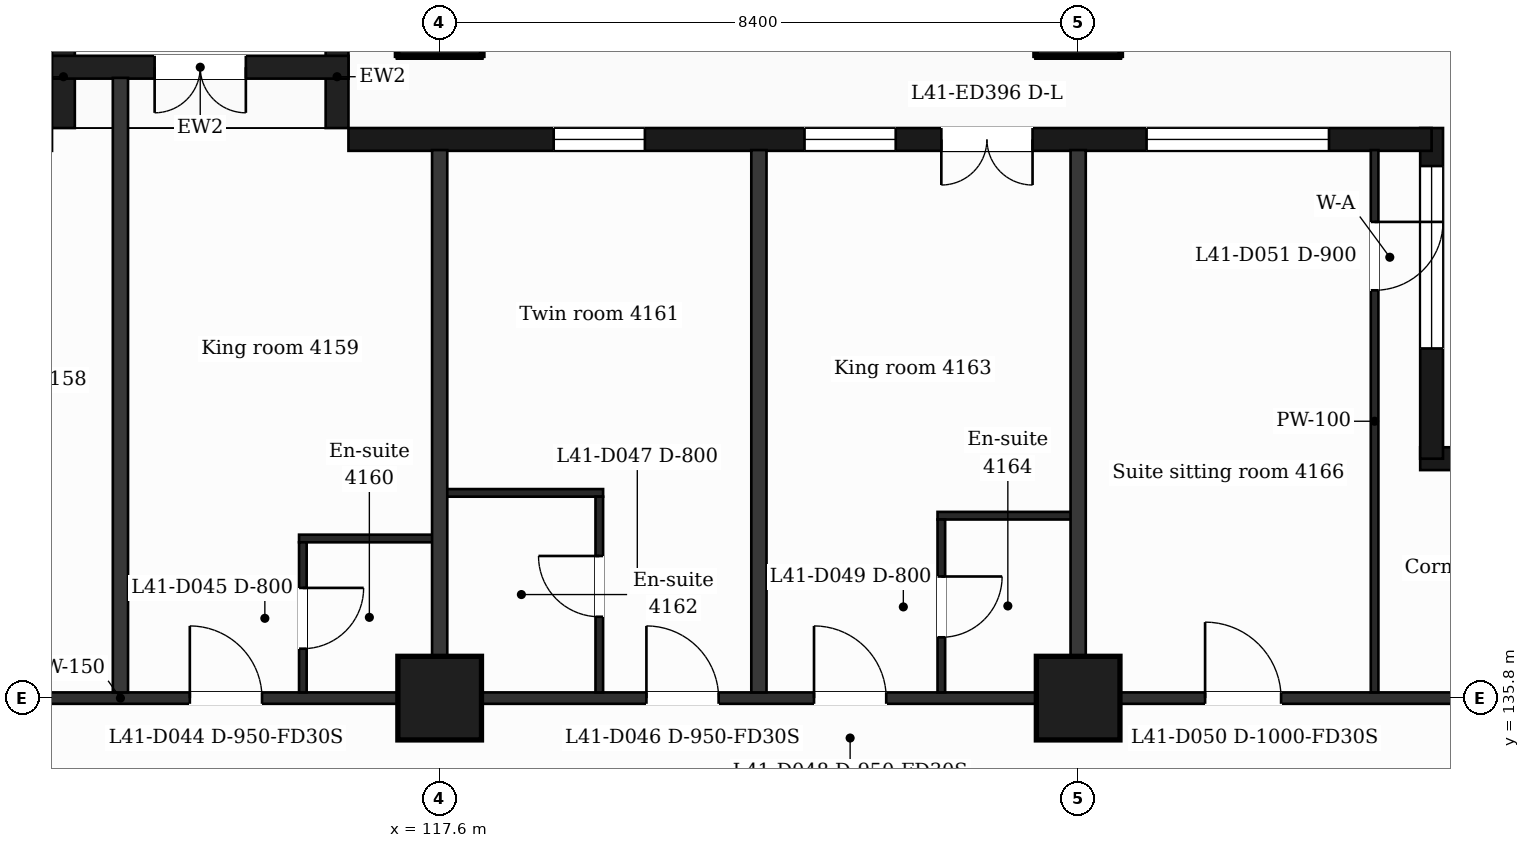
"""IFC4 building model, lengths in metres.
Left out: names, types, materials, properties, quantities, classifications, styles, units other than length and angle.
Written with IfcOpenShell. Run it as: python <this file> out.ifc"""

import sys

from ifc_helpers import new_model, si_unit, direction, frame, frame_2d, origin, origin_2d, place, context, subcontext, project, spatial, rectangle, extrude, element, fill, save


model = new_model("IFC4")
c1 = context("Model", 3, precision=1e-05, world=origin(), true_north=direction((0.0, 1.0)))
c2 = subcontext(c1, "Body", "Model", "MODEL_VIEW")
j1 = project(units=[si_unit("LENGTHUNIT", "METRE"), si_unit("PLANEANGLEUNIT", "RADIAN")], contexts=[c1])
p1 = place(None, origin())
s1 = spatial("IfcSite", under=j1, at=p1, CompositionType="ELEMENT")
p2 = place(p1, origin())
s2 = spatial("IfcBuilding", under=s1, at=p2, CompositionType="ELEMENT")
p3 = place(p2, frame((0.0, 0.0, 173.7)))
s3 = spatial("IfcBuildingStorey", under=s2, at=p3, CompositionType="ELEMENT", Elevation=173.7)
for number, where, z_axis, x_axis in (
    (1, (117.6, 135.8, 0.0), (0.0, 0.0, 1.0), (1.0, 0.0, 0.0)),
    (2, (126.0, 135.8, 0.0), (0.0, 0.0, 1.0), (1.0, 0.0, 0.0)),
    (3, (117.6, 144.8, 0.0), (0.0, 0.0, 1.0), (1.0, 0.0, 0.0)),
    (4, (126.0, 144.8, 0.0), (0.0, 0.0, 1.0), (1.0, 0.0, 0.0)),
):
    element("IfcColumn", number, at=place(p3, frame(where, z_axis=z_axis, x_axis=x_axis)), inside=s3, PredefinedType="COLUMN", context=c2, shape_type="SweptSolid", body=[
        extrude(rectangle(XDim=1.1, YDim=1.1, at=origin_2d()), origin(), (0.0, 0.0, 1.0), 3.7),
    ])
p4 = place(p3, frame((135.623, 138.95, 0.0), z_axis=(0.0, 0.0, 1.0), x_axis=(-1.0, 0.0, 0.0)))
e5 = element("IfcWall", 5, at=p4, inside=s3, PredefinedType="SOLIDWALL", context=c2, shape_type="SweptSolid", body=[
    extrude(rectangle(XDim=5.123, YDim=0.3, at=frame_2d((2.561, 0.0))), origin(), (0.0, 0.0, 1.0), 3.38),
])
p5 = place(p4, frame((1.673, 0.0, 0.9)))
e6 = element("IfcOpeningElement", 6, at=p5, cuts=e5, PredefinedType="OPENING", context=c2, shape_type="SweptSolid", body=[
    extrude(rectangle(XDim=1.2, YDim=2.1, at=frame_2d((0.6, 1.05))), frame((0.0, 0.16, 0.0), z_axis=(0.0, -1.0, 0.0), x_axis=(1.0, 0.0, 0.0)), (0.0, 0.0, 1.0), 0.32),
])
p6 = place(p4, frame((3.473, 0.0, 0.9)))
e7 = element("IfcOpeningElement", 7, at=p6, cuts=e5, PredefinedType="OPENING", context=c2, shape_type="SweptSolid", body=[
    extrude(rectangle(XDim=1.2, YDim=2.1, at=frame_2d((0.6, 1.05))), frame((0.0, 0.16, 0.0), z_axis=(0.0, -1.0, 0.0), x_axis=(1.0, 0.0, 0.0)), (0.0, 0.0, 1.0), 0.32),
])
p7 = place(p3, frame((130.65, 138.95, 0.0), z_axis=(0.0, 0.0, 1.0), x_axis=(0.0, 1.0, 0.0)))
e8 = element("IfcWall", 8, at=p7, inside=s3, PredefinedType="SOLIDWALL", context=c2, shape_type="SweptSolid", body=[
    extrude(rectangle(XDim=4.35, YDim=0.3, at=frame_2d((2.175, 0.0))), origin(), (0.0, 0.0, 1.0), 3.38),
])
p8 = place(p7, frame((1.45, 0.0, 0.9)))
e9 = element("IfcOpeningElement", 9, at=p8, cuts=e8, PredefinedType="OPENING", context=c2, shape_type="SweptSolid", body=[
    extrude(rectangle(XDim=2.4, YDim=2.1, at=frame_2d((1.2, 1.05))), frame((0.0, 0.16, 0.0), z_axis=(0.0, -1.0, 0.0), x_axis=(1.0, 0.0, 0.0)), (0.0, 0.0, 1.0), 0.32),
])
p9 = place(p3, frame((130.65, 143.15, 0.0), z_axis=(0.0, 0.0, 1.0), x_axis=(-1.0, 0.0, 0.0)))
e10 = element("IfcWall", 10, at=p9, inside=s3, PredefinedType="SOLIDWALL", context=c2, shape_type="SweptSolid", body=[
    extrude(rectangle(XDim=14.25, YDim=0.3, at=frame_2d((7.125, 0.0))), origin(), (0.0, 0.0, 1.0), 3.38),
])
p10 = place(p9, frame((1.35, 0.0, 0.9)))
e11 = element("IfcOpeningElement", 11, at=p10, cuts=e10, PredefinedType="OPENING", context=c2, shape_type="SweptSolid", body=[
    extrude(rectangle(XDim=2.4, YDim=2.1, at=frame_2d((1.2, 1.05))), frame((0.0, 0.16, 0.0), z_axis=(0.0, -1.0, 0.0), x_axis=(1.0, 0.0, 0.0)), (0.0, 0.0, 1.0), 0.32),
])
p11 = place(p9, frame((5.25, 0.0, 0.0)))
e12 = element("IfcOpeningElement", 12, at=p11, cuts=e10, PredefinedType="OPENING", context=c2, shape_type="SweptSolid", body=[
    extrude(rectangle(XDim=1.2, YDim=2.4, at=frame_2d((0.6, 1.2))), frame((0.0, 0.16, 0.0), z_axis=(0.0, -1.0, 0.0), x_axis=(1.0, 0.0, 0.0)), (0.0, 0.0, 1.0), 0.32),
])
p12 = place(p9, frame((7.05, 0.0, 0.9)))
e13 = element("IfcOpeningElement", 13, at=p12, cuts=e10, PredefinedType="OPENING", context=c2, shape_type="SweptSolid", body=[
    extrude(rectangle(XDim=1.2, YDim=2.1, at=frame_2d((0.6, 1.05))), frame((0.0, 0.16, 0.0), z_axis=(0.0, -1.0, 0.0), x_axis=(1.0, 0.0, 0.0)), (0.0, 0.0, 1.0), 0.32),
])
p13 = place(p9, frame((10.35, 0.0, 0.9)))
e14 = element("IfcOpeningElement", 14, at=p13, cuts=e10, PredefinedType="OPENING", context=c2, shape_type="SweptSolid", body=[
    extrude(rectangle(XDim=1.2, YDim=2.1, at=frame_2d((0.6, 1.05))), frame((0.0, 0.16, 0.0), z_axis=(0.0, -1.0, 0.0), x_axis=(1.0, 0.0, 0.0)), (0.0, 0.0, 1.0), 0.32),
])
for number, where, z_axis, x_axis in (
    (15, (116.25, 143.3, 0.0), (0.0, 0.0, 1.0), (0.0, 1.0, 0.0)),
    (16, (112.65, 143.3, 0.0), (0.0, 0.0, 1.0), (0.0, 1.0, 0.0)),
):
    element("IfcWall", number, at=place(p3, frame(where, z_axis=z_axis, x_axis=x_axis)), inside=s3, PredefinedType="SOLIDWALL", context=c2, shape_type="SweptSolid", body=[
        extrude(rectangle(XDim=1.35, YDim=0.3, at=frame_2d((0.675, 0.0))), origin(), (0.0, 0.0, 1.0), 3.38),
    ])
p14 = place(p3, frame((116.4, 144.1, 0.0), z_axis=(0.0, 0.0, 1.0), x_axis=(-1.0, 0.0, 0.0)))
e17 = element("IfcWall", 17, at=p14, inside=s3, PredefinedType="SOLIDWALL", context=c2, shape_type="SweptSolid", body=[
    extrude(rectangle(XDim=3.9, YDim=0.3, at=frame_2d((1.95, 0.0))), origin(), (0.0, 0.0, 1.0), 3.38),
])
p15 = place(p14, frame((1.35, 0.0, 0.0)))
e18 = element("IfcOpeningElement", 18, at=p15, cuts=e17, PredefinedType="OPENING", context=c2, shape_type="SweptSolid", body=[
    extrude(rectangle(XDim=1.2, YDim=2.4, at=frame_2d((0.6, 1.2))), frame((0.0, 0.16, 0.0), z_axis=(0.0, -1.0, 0.0), x_axis=(1.0, 0.0, 0.0)), (0.0, 0.0, 1.0), 0.32),
])
p16 = place(p3, frame((90.895, 135.8, 0.0), z_axis=(0.0, 0.0, 1.0), x_axis=(1.0, 0.0, 0.0)))
e19 = element("IfcWall", 19, at=p16, inside=s3, PredefinedType="PARTITIONING", context=c2, shape_type="SweptSolid", body=[
    extrude(rectangle(XDim=45.011, YDim=0.15, at=frame_2d((22.505, 0.0))), origin(), (0.0, 0.0, 1.0), 3.38),
])
p17 = place(p16, frame((6.906, 0.0, 0.0)))
e20 = element("IfcOpeningElement", 20, at=p17, cuts=e19, PredefinedType="OPENING", context=c2, shape_type="SweptSolid", body=[
    extrude(rectangle(XDim=1.0, YDim=2.1, at=frame_2d((0.5, 1.05))), frame((0.0, 0.085, 0.0), z_axis=(0.0, -1.0, 0.0), x_axis=(1.0, 0.0, 0.0)), (0.0, 0.0, 1.0), 0.17),
])
p18 = place(p16, frame((11.875, 0.0, 0.0)))
e21 = element("IfcOpeningElement", 21, at=p18, cuts=e19, PredefinedType="OPENING", context=c2, shape_type="SweptSolid", body=[
    extrude(rectangle(XDim=0.95, YDim=2.1, at=frame_2d((0.475, 1.05))), frame((0.0, 0.085, 0.0), z_axis=(0.0, -1.0, 0.0), x_axis=(1.0, 0.0, 0.0)), (0.0, 0.0, 1.0), 0.17),
])
p19 = place(p16, frame((19.292, 0.0, 0.0)))
e22 = element("IfcOpeningElement", 22, at=p19, cuts=e19, PredefinedType="OPENING", context=c2, shape_type="SweptSolid", body=[
    extrude(rectangle(XDim=0.95, YDim=2.1, at=frame_2d((0.475, 1.05))), frame((0.0, 0.085, 0.0), z_axis=(0.0, -1.0, 0.0), x_axis=(1.0, 0.0, 0.0)), (0.0, 0.0, 1.0), 0.17),
])
p20 = place(p16, frame((23.418, 0.0, 0.0)))
e23 = element("IfcOpeningElement", 23, at=p20, cuts=e19, PredefinedType="OPENING", context=c2, shape_type="SweptSolid", body=[
    extrude(rectangle(XDim=0.95, YDim=2.1, at=frame_2d((0.475, 1.05))), frame((0.0, 0.085, 0.0), z_axis=(0.0, -1.0, 0.0), x_axis=(1.0, 0.0, 0.0)), (0.0, 0.0, 1.0), 0.17),
])
p21 = place(p16, frame((29.425, 0.0, 0.0)))
e24 = element("IfcOpeningElement", 24, at=p21, cuts=e19, PredefinedType="OPENING", context=c2, shape_type="SweptSolid", body=[
    extrude(rectangle(XDim=0.95, YDim=2.1, at=frame_2d((0.475, 1.05))), frame((0.0, 0.085, 0.0), z_axis=(0.0, -1.0, 0.0), x_axis=(1.0, 0.0, 0.0)), (0.0, 0.0, 1.0), 0.17),
])
p22 = place(p16, frame((31.63, 0.0, 0.0)))
e25 = element("IfcOpeningElement", 25, at=p22, cuts=e19, PredefinedType="OPENING", context=c2, shape_type="SweptSolid", body=[
    extrude(rectangle(XDim=0.95, YDim=2.1, at=frame_2d((0.475, 1.05))), frame((0.0, 0.085, 0.0), z_axis=(0.0, -1.0, 0.0), x_axis=(1.0, 0.0, 0.0)), (0.0, 0.0, 1.0), 0.17),
])
p23 = place(p16, frame((36.775, 0.0, 0.0)))
e26 = element("IfcOpeningElement", 26, at=p23, cuts=e19, PredefinedType="OPENING", context=c2, shape_type="SweptSolid", body=[
    extrude(rectangle(XDim=1.0, YDim=2.1, at=frame_2d((0.5, 1.05))), frame((0.0, 0.085, 0.0), z_axis=(0.0, -1.0, 0.0), x_axis=(1.0, 0.0, 0.0)), (0.0, 0.0, 1.0), 0.17),
])
for number, where, z_axis, x_axis in (
    (27, (115.75, 137.9, 0.0), (0.0, 0.0, 1.0), (1.0, 0.0, 0.0)),
    (28, (124.15, 138.2, 0.0), (0.0, 0.0, 1.0), (1.0, 0.0, 0.0)),
):
    element("IfcWall", number, at=place(p3, frame(where, z_axis=z_axis, x_axis=x_axis)), inside=s3, PredefinedType="PARTITIONING", context=c2, shape_type="SweptSolid", body=[
        extrude(rectangle(XDim=1.85, YDim=0.1, at=frame_2d((0.925, 0.0))), origin(), (0.0, 0.0, 1.0), 3.38),
    ])
p24 = place(p3, frame((117.6, 138.5, 0.0), z_axis=(0.0, 0.0, 1.0), x_axis=(1.0, 0.0, 0.0)))
e29 = element("IfcWall", 29, at=p24, inside=s3, PredefinedType="PARTITIONING", context=c2, shape_type="SweptSolid", body=[
    extrude(rectangle(XDim=2.15, YDim=0.1, at=frame_2d((1.075, 0.0))), origin(), (0.0, 0.0, 1.0), 3.38),
])
p25 = place(p3, frame((113.4, 135.875, 0.0), z_axis=(0.0, 0.0, 1.0), x_axis=(0.0, 1.0, 0.0)))
e30 = element("IfcWall", 30, at=p25, inside=s3, PredefinedType="PARTITIONING", context=c2, shape_type="SweptSolid", body=[
    extrude(rectangle(XDim=8.085, YDim=0.2, at=frame_2d((4.042, 0.0))), origin(), (0.0, 0.0, 1.0), 3.38),
])
p26 = place(p3, frame((115.8, 135.875, 0.0), z_axis=(0.0, 0.0, 1.0), x_axis=(0.0, 1.0, 0.0)))
e31 = element("IfcWall", 31, at=p26, inside=s3, PredefinedType="PARTITIONING", context=c2, shape_type="SweptSolid", body=[
    extrude(rectangle(XDim=1.975, YDim=0.1, at=frame_2d((0.988, 0.0))), origin(), (0.0, 0.0, 1.0), 3.38),
])
p27 = place(p26, frame((0.575, 0.0, 0.0)))
e32 = element("IfcOpeningElement", 32, at=p27, cuts=e31, PredefinedType="OPENING", context=c2, shape_type="SweptSolid", body=[
    extrude(rectangle(XDim=0.8, YDim=2.1, at=frame_2d((0.4, 1.05))), frame((0.0, 0.06, 0.0), z_axis=(0.0, -1.0, 0.0), x_axis=(1.0, 0.0, 0.0)), (0.0, 0.0, 1.0), 0.12),
])
p28 = place(p3, frame((117.6, 135.875, 0.0), z_axis=(0.0, 0.0, 1.0), x_axis=(0.0, 1.0, 0.0)))
e33 = element("IfcWall", 33, at=p28, inside=s3, PredefinedType="PARTITIONING", context=c2, shape_type="SweptSolid", body=[
    extrude(rectangle(XDim=7.135, YDim=0.2, at=frame_2d((3.567, 0.0))), origin(), (0.0, 0.0, 1.0), 3.38),
])
p29 = place(p3, frame((119.7, 135.875, 0.0), z_axis=(0.0, 0.0, 1.0), x_axis=(0.0, 1.0, 0.0)))
e34 = element("IfcWall", 34, at=p29, inside=s3, PredefinedType="PARTITIONING", context=c2, shape_type="SweptSolid", body=[
    extrude(rectangle(XDim=2.575, YDim=0.1, at=frame_2d((1.288, 0.0))), origin(), (0.0, 0.0, 1.0), 3.38),
])
p30 = place(p29, frame((0.995, 0.0, 0.0)))
e35 = element("IfcOpeningElement", 35, at=p30, cuts=e34, PredefinedType="OPENING", context=c2, shape_type="SweptSolid", body=[
    extrude(rectangle(XDim=0.8, YDim=2.1, at=frame_2d((0.4, 1.05))), frame((0.0, 0.06, 0.0), z_axis=(0.0, -1.0, 0.0), x_axis=(1.0, 0.0, 0.0)), (0.0, 0.0, 1.0), 0.12),
])
p31 = place(p3, frame((121.8, 135.875, 0.0), z_axis=(0.0, 0.0, 1.0), x_axis=(0.0, 1.0, 0.0)))
e36 = element("IfcWall", 36, at=p31, inside=s3, PredefinedType="PARTITIONING", context=c2, shape_type="SweptSolid", body=[
    extrude(rectangle(XDim=7.135, YDim=0.2, at=frame_2d((3.567, 0.0))), origin(), (0.0, 0.0, 1.0), 3.38),
])
p32 = place(p3, frame((124.2, 135.875, 0.0), z_axis=(0.0, 0.0, 1.0), x_axis=(0.0, 1.0, 0.0)))
e37 = element("IfcWall", 37, at=p32, inside=s3, PredefinedType="PARTITIONING", context=c2, shape_type="SweptSolid", body=[
    extrude(rectangle(XDim=2.275, YDim=0.1, at=frame_2d((1.137, 0.0))), origin(), (0.0, 0.0, 1.0), 3.38),
])
p33 = place(p32, frame((0.725, 0.0, 0.0)))
e38 = element("IfcOpeningElement", 38, at=p33, cuts=e37, PredefinedType="OPENING", context=c2, shape_type="SweptSolid", body=[
    extrude(rectangle(XDim=0.8, YDim=2.1, at=frame_2d((0.4, 1.05))), frame((0.0, 0.06, 0.0), z_axis=(0.0, -1.0, 0.0), x_axis=(1.0, 0.0, 0.0)), (0.0, 0.0, 1.0), 0.12),
])
p34 = place(p3, frame((126.0, 135.875, 0.0), z_axis=(0.0, 0.0, 1.0), x_axis=(0.0, 1.0, 0.0)))
e39 = element("IfcWall", 39, at=p34, inside=s3, PredefinedType="PARTITIONING", context=c2, shape_type="SweptSolid", body=[
    extrude(rectangle(XDim=7.135, YDim=0.2, at=frame_2d((3.567, 0.0))), origin(), (0.0, 0.0, 1.0), 3.38),
])
p35 = place(p3, frame((129.9, 135.875, 0.0), z_axis=(0.0, 0.0, 1.0), x_axis=(0.0, 1.0, 0.0)))
e40 = element("IfcWall", 40, at=p35, inside=s3, PredefinedType="PARTITIONING", context=c2, shape_type="SweptSolid", body=[
    extrude(rectangle(XDim=7.135, YDim=0.1, at=frame_2d((3.567, 0.0))), origin(), (0.0, 0.0, 1.0), 3.38),
])
p36 = place(p35, frame((5.29, 0.0, 0.0)))
e41 = element("IfcOpeningElement", 41, at=p36, cuts=e40, PredefinedType="OPENING", context=c2, shape_type="SweptSolid", body=[
    extrude(rectangle(XDim=0.9, YDim=2.1, at=frame_2d((0.45, 1.05))), frame((0.0, 0.06, 0.0), z_axis=(0.0, -1.0, 0.0), x_axis=(1.0, 0.0, 0.0)), (0.0, 0.0, 1.0), 0.12),
])
p37 = place(p8, origin())
e42 = element("IfcWindow", 42, at=p37, inside=s3, PartitioningType="SINGLE_PANEL", PredefinedType="WINDOW", context=c2, shape_type="SweptSolid", body=[
    extrude(rectangle(XDim=2.4, YDim=2.1, at=frame_2d((1.2, 1.05))), frame((0.0, 0.03, 0.0), z_axis=(0.0, -1.0, 0.0), x_axis=(1.0, 0.0, 0.0)), (0.0, 0.0, 1.0), 0.06),
])
fill(e9, e42)
p38 = place(p10, origin())
e43 = element("IfcWindow", 43, at=p38, inside=s3, PartitioningType="SINGLE_PANEL", PredefinedType="WINDOW", context=c2, shape_type="SweptSolid", body=[
    extrude(rectangle(XDim=2.4, YDim=2.1, at=frame_2d((1.2, 1.05))), frame((0.0, 0.03, 0.0), z_axis=(0.0, -1.0, 0.0), x_axis=(1.0, 0.0, 0.0)), (0.0, 0.0, 1.0), 0.06),
])
fill(e11, e43)
p39 = place(p11, origin())
e44 = element("IfcDoor", 44, at=p39, inside=s3, OperationType="DOUBLE_DOOR_SINGLE_SWING", PredefinedType="DOOR", context=c2, shape_type="SweptSolid", body=[
    extrude(rectangle(XDim=1.2, YDim=2.4, at=frame_2d((0.6, 1.2))), frame((0.0, 0.025, 0.0), z_axis=(0.0, -1.0, 0.0), x_axis=(1.0, 0.0, 0.0)), (0.0, 0.0, 1.0), 0.05),
])
fill(e12, e44)
p40 = place(p12, origin())
e45 = element("IfcWindow", 45, at=p40, inside=s3, PartitioningType="SINGLE_PANEL", PredefinedType="WINDOW", context=c2, shape_type="SweptSolid", body=[
    extrude(rectangle(XDim=1.2, YDim=2.1, at=frame_2d((0.6, 1.05))), frame((0.0, 0.03, 0.0), z_axis=(0.0, -1.0, 0.0), x_axis=(1.0, 0.0, 0.0)), (0.0, 0.0, 1.0), 0.06),
])
fill(e13, e45)
p41 = place(p13, origin())
e46 = element("IfcWindow", 46, at=p41, inside=s3, PartitioningType="SINGLE_PANEL", PredefinedType="WINDOW", context=c2, shape_type="SweptSolid", body=[
    extrude(rectangle(XDim=1.2, YDim=2.1, at=frame_2d((0.6, 1.05))), frame((0.0, 0.03, 0.0), z_axis=(0.0, -1.0, 0.0), x_axis=(1.0, 0.0, 0.0)), (0.0, 0.0, 1.0), 0.06),
])
fill(e14, e46)
p42 = place(p15, origin())
e47 = element("IfcDoor", 47, at=p42, inside=s3, OperationType="DOUBLE_DOOR_SINGLE_SWING", PredefinedType="DOOR", context=c2, shape_type="SweptSolid", body=[
    extrude(rectangle(XDim=1.2, YDim=2.4, at=frame_2d((0.6, 1.2))), frame((0.0, 0.025, 0.0), z_axis=(0.0, -1.0, 0.0), x_axis=(1.0, 0.0, 0.0)), (0.0, 0.0, 1.0), 0.05),
])
fill(e18, e47)
p43 = place(p20, origin())
e48 = element("IfcDoor", 48, at=p43, inside=s3, OperationType="SINGLE_SWING_LEFT", PredefinedType="DOOR", context=c2, shape_type="SweptSolid", body=[
    extrude(rectangle(XDim=0.95, YDim=2.1, at=frame_2d((0.475, 1.05))), frame((0.0, 0.025, 0.0), z_axis=(0.0, -1.0, 0.0), x_axis=(1.0, 0.0, 0.0)), (0.0, 0.0, 1.0), 0.05),
])
fill(e23, e48)
p44 = place(p27, origin())
e49 = element("IfcDoor", 49, at=p44, inside=s3, OperationType="SINGLE_SWING_RIGHT", PredefinedType="DOOR", context=c2, shape_type="SweptSolid", body=[
    extrude(rectangle(XDim=0.8, YDim=2.1, at=frame_2d((0.4, 1.05))), frame((0.0, 0.025, 0.0), z_axis=(0.0, -1.0, 0.0), x_axis=(1.0, 0.0, 0.0)), (0.0, 0.0, 1.0), 0.05),
])
fill(e32, e49)
p45 = place(p21, origin())
e50 = element("IfcDoor", 50, at=p45, inside=s3, OperationType="SINGLE_SWING_LEFT", PredefinedType="DOOR", context=c2, shape_type="SweptSolid", body=[
    extrude(rectangle(XDim=0.95, YDim=2.1, at=frame_2d((0.475, 1.05))), frame((0.0, 0.025, 0.0), z_axis=(0.0, -1.0, 0.0), x_axis=(1.0, 0.0, 0.0)), (0.0, 0.0, 1.0), 0.05),
])
fill(e24, e50)
p46 = place(p30, origin())
e51 = element("IfcDoor", 51, at=p46, inside=s3, OperationType="SINGLE_SWING_RIGHT", PredefinedType="DOOR", context=c2, shape_type="SweptSolid", body=[
    extrude(rectangle(XDim=0.8, YDim=2.1, at=frame_2d((0.4, 1.05))), frame((0.0, 0.025, 0.0), z_axis=(0.0, -1.0, 0.0), x_axis=(1.0, 0.0, 0.0)), (0.0, 0.0, 1.0), 0.05),
])
fill(e35, e51)
p47 = place(p22, origin())
e52 = element("IfcDoor", 52, at=p47, inside=s3, OperationType="SINGLE_SWING_LEFT", PredefinedType="DOOR", context=c2, shape_type="SweptSolid", body=[
    extrude(rectangle(XDim=0.95, YDim=2.1, at=frame_2d((0.475, 1.05))), frame((0.0, 0.025, 0.0), z_axis=(0.0, -1.0, 0.0), x_axis=(1.0, 0.0, 0.0)), (0.0, 0.0, 1.0), 0.05),
])
fill(e25, e52)
p48 = place(p33, origin())
e53 = element("IfcDoor", 53, at=p48, inside=s3, OperationType="SINGLE_SWING_RIGHT", PredefinedType="DOOR", context=c2, shape_type="SweptSolid", body=[
    extrude(rectangle(XDim=0.8, YDim=2.1, at=frame_2d((0.4, 1.05))), frame((0.0, 0.025, 0.0), z_axis=(0.0, -1.0, 0.0), x_axis=(1.0, 0.0, 0.0)), (0.0, 0.0, 1.0), 0.05),
])
fill(e38, e53)
p49 = place(p23, origin())
e54 = element("IfcDoor", 54, at=p49, inside=s3, OperationType="SINGLE_SWING_LEFT", PredefinedType="DOOR", context=c2, shape_type="SweptSolid", body=[
    extrude(rectangle(XDim=1.0, YDim=2.1, at=frame_2d((0.5, 1.05))), frame((0.0, 0.025, 0.0), z_axis=(0.0, -1.0, 0.0), x_axis=(1.0, 0.0, 0.0)), (0.0, 0.0, 1.0), 0.05),
])
fill(e26, e54)
p50 = place(p36, origin())
e55 = element("IfcDoor", 55, at=p50, inside=s3, OperationType="SINGLE_SWING_RIGHT", PredefinedType="DOOR", context=c2, shape_type="SweptSolid", body=[
    extrude(rectangle(XDim=0.9, YDim=2.1, at=frame_2d((0.45, 1.05))), frame((0.0, 0.025, 0.0), z_axis=(0.0, -1.0, 0.0), x_axis=(1.0, 0.0, 0.0)), (0.0, 0.0, 1.0), 0.05),
])
fill(e41, e55)
save(model, sys.argv[1])
